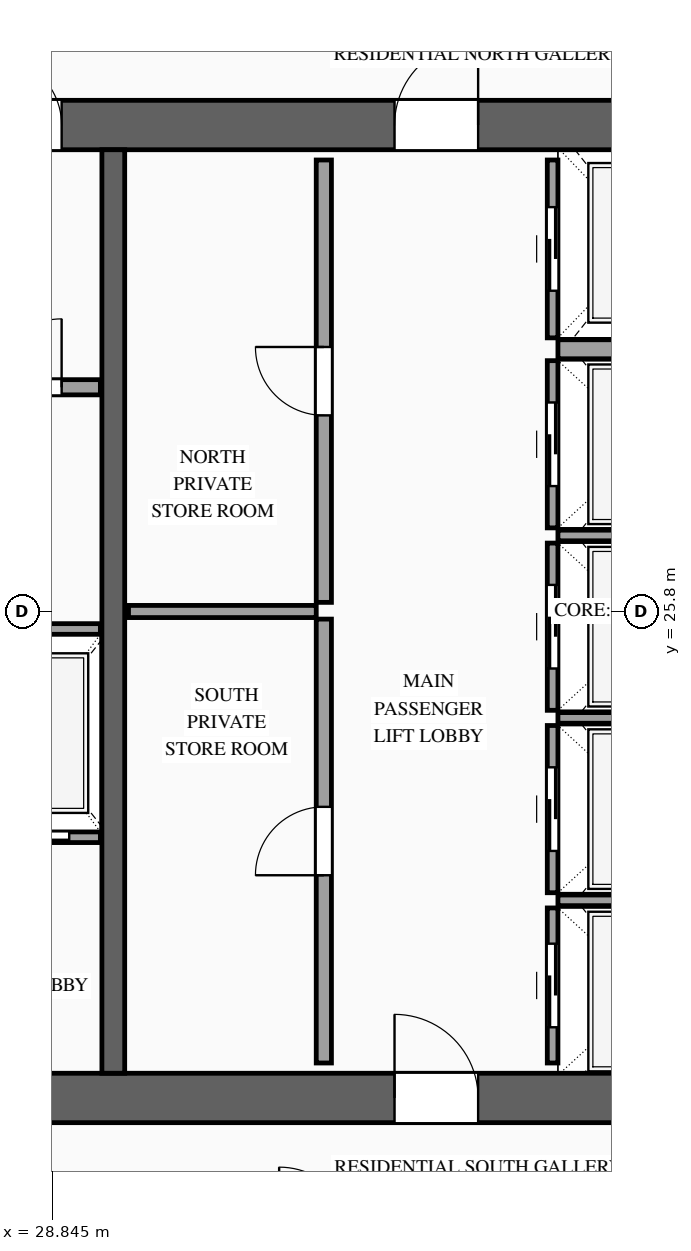
"""IFC4 building model, lengths in metres.
Left out: names, types, materials, properties, quantities, classifications, styles, units other than length and angle.
Written with IfcOpenShell. Run it as: python <this file> out.ifc"""

import sys

from ifc_helpers import new_model, si_unit, direction, frame, frame_2d, origin, place, context, subcontext, project, spatial, rectangle, extrude, source, transform, mapped, element, fill, save


model = new_model("IFC4")
c1 = context("Model", 3, precision=1e-05, world=origin(), true_north=direction((0.0, 1.0)))
c2 = subcontext(c1, "Body", "Model", "MODEL_VIEW")
j1 = project(units=[si_unit("LENGTHUNIT", "METRE"), si_unit("PLANEANGLEUNIT", "RADIAN")], contexts=[c1])
p1 = place(None, origin())
s1 = spatial("IfcSite", under=j1, at=p1, CompositionType="ELEMENT")
p2 = place(p1, origin())
s2 = spatial("IfcBuilding", under=s1, at=p2, CompositionType="ELEMENT")
p3 = place(p2, frame((0.0, 0.0, 181.0)))
s3 = spatial("IfcBuildingStorey", under=s2, at=p3, CompositionType="ELEMENT", Elevation=181.0)
p4 = place(p3, frame((23.475, 19.4, 0.0), z_axis=(0.0, 0.0, 1.0), x_axis=(1.0, 0.0, 0.0)))
e1 = element("IfcWall", 1, at=p4, inside=s3, PredefinedType="SHEAR", context=c2, shape_type="SweptSolid", body=[
    extrude(rectangle(XDim=27.05, YDim=0.65, at=frame_2d((13.525, 0.0))), origin(), (0.0, 0.0, 1.0), 3.5),
])
p5 = place(p4, frame((1.975, 0.0, 0.0)))
e2 = element("IfcOpeningElement", 2, at=p5, cuts=e1, PredefinedType="OPENING", context=c2, shape_type="SweptSolid", body=[
    extrude(rectangle(XDim=1.1, YDim=2.2, at=frame_2d((0.55, 1.1))), frame((0.0, 0.34, 0.0), z_axis=(0.0, -1.0, 0.0), x_axis=(1.0, 0.0, 0.0)), (0.0, 0.0, 1.0), 0.68),
])
p6 = place(p4, frame((9.875, 0.0, 0.0)))
e3 = element("IfcOpeningElement", 3, at=p6, cuts=e1, PredefinedType="OPENING", context=c2, shape_type="SweptSolid", body=[
    extrude(rectangle(XDim=1.1, YDim=2.2, at=frame_2d((0.55, 1.1))), frame((0.0, 0.34, 0.0), z_axis=(0.0, -1.0, 0.0), x_axis=(1.0, 0.0, 0.0)), (0.0, 0.0, 1.0), 0.68),
])
p7 = place(p4, frame((23.075, 0.0, 0.0)))
e4 = element("IfcOpeningElement", 4, at=p7, cuts=e1, PredefinedType="OPENING", context=c2, shape_type="SweptSolid", body=[
    extrude(rectangle(XDim=1.1, YDim=2.2, at=frame_2d((0.55, 1.1))), frame((0.0, 0.34, 0.0), z_axis=(0.0, -1.0, 0.0), x_axis=(1.0, 0.0, 0.0)), (0.0, 0.0, 1.0), 0.68),
])
p8 = place(p4, frame((19.695, 0.0, 0.0)))
e5 = element("IfcOpeningElement", 5, at=p8, cuts=e1, PredefinedType="OPENING", context=c2, shape_type="SweptSolid", body=[
    extrude(rectangle(XDim=0.9, YDim=2.15, at=frame_2d((0.45, 1.075))), frame((0.0, 0.34, 0.0), z_axis=(0.0, -1.0, 0.0), x_axis=(1.0, 0.0, 0.0)), (0.0, 0.0, 1.0), 0.68),
])
p9 = place(p4, frame((18.255, 0.0, 0.0)))
e6 = element("IfcOpeningElement", 6, at=p9, cuts=e1, PredefinedType="OPENING", context=c2, shape_type="SweptSolid", body=[
    extrude(rectangle(XDim=0.9, YDim=2.15, at=frame_2d((0.45, 1.075))), frame((0.0, 0.34, 0.0), z_axis=(0.0, -1.0, 0.0), x_axis=(1.0, 0.0, 0.0)), (0.0, 0.0, 1.0), 0.68),
])
p10 = place(p3, frame((23.475, 32.2, 0.0), z_axis=(0.0, 0.0, 1.0), x_axis=(1.0, 0.0, 0.0)))
e7 = element("IfcWall", 7, at=p10, inside=s3, PredefinedType="SHEAR", context=c2, shape_type="SweptSolid", body=[
    extrude(rectangle(XDim=27.05, YDim=0.65, at=frame_2d((13.525, 0.0))), origin(), (0.0, 0.0, 1.0), 3.5),
])
p11 = place(p10, frame((4.595, 0.0, 0.0)))
e8 = element("IfcOpeningElement", 8, at=p11, cuts=e7, PredefinedType="OPENING", context=c2, shape_type="SweptSolid", body=[
    extrude(rectangle(XDim=0.9, YDim=2.15, at=frame_2d((0.45, 1.075))), frame((0.0, 0.34, 0.0), z_axis=(0.0, -1.0, 0.0), x_axis=(1.0, 0.0, 0.0)), (0.0, 0.0, 1.0), 0.68),
])
p12 = place(p10, frame((9.875, 0.0, 0.0)))
e9 = element("IfcOpeningElement", 9, at=p12, cuts=e7, PredefinedType="OPENING", context=c2, shape_type="SweptSolid", body=[
    extrude(rectangle(XDim=1.1, YDim=2.2, at=frame_2d((0.55, 1.1))), frame((0.0, 0.34, 0.0), z_axis=(0.0, -1.0, 0.0), x_axis=(1.0, 0.0, 0.0)), (0.0, 0.0, 1.0), 0.68),
])
p13 = place(p10, frame((15.725, 0.0, 0.0)))
e10 = element("IfcOpeningElement", 10, at=p13, cuts=e7, PredefinedType="OPENING", context=c2, shape_type="SweptSolid", body=[
    extrude(rectangle(XDim=1.1, YDim=2.2, at=frame_2d((0.55, 1.1))), frame((0.0, 0.34, 0.0), z_axis=(0.0, -1.0, 0.0), x_axis=(1.0, 0.0, 0.0)), (0.0, 0.0, 1.0), 0.68),
])
p14 = place(p10, frame((19.695, 0.0, 0.0)))
e11 = element("IfcOpeningElement", 11, at=p14, cuts=e7, PredefinedType="OPENING", context=c2, shape_type="SweptSolid", body=[
    extrude(rectangle(XDim=0.9, YDim=2.15, at=frame_2d((0.45, 1.075))), frame((0.0, 0.34, 0.0), z_axis=(0.0, -1.0, 0.0), x_axis=(1.0, 0.0, 0.0)), (0.0, 0.0, 1.0), 0.68),
])
m1 = source(origin(), c2, "Body", "SweptSolid", [
    extrude(rectangle(XDim=12.15, YDim=0.3, at=frame_2d((6.075, 0.0))), origin(), (0.0, 0.0, 1.0), 3.5),
])
p15 = place(p3, frame((29.65, 19.725, 0.0), z_axis=(0.0, 0.0, 1.0), x_axis=(0.0, 1.0, 0.0)))
e12 = element("IfcWall", 12, at=p15, inside=s3, PredefinedType="SOLIDWALL", context=c2, shape_type="MappedRepresentation", body=[
    mapped(m1, transform((0.0, 0.0, 0.0), scale=1.0)),
])
p16 = place(p3, frame((27.56, 22.83, 0.0), z_axis=(0.0, 0.0, 1.0), x_axis=(1.0, 0.0, 0.0)))
e13 = element("IfcWall", 13, at=p16, inside=s3, PredefinedType="SOLIDWALL", context=c2, shape_type="SweptSolid", body=[
    extrude(rectangle(XDim=1.92, YDim=0.14, at=frame_2d((0.96, 0.0))), origin(), (0.0, 0.0, 1.0), 3.28),
])
p17 = place(p16, frame((0.41, 0.0, 0.0)))
e14 = element("IfcOpeningElement", 14, at=p17, cuts=e13, PredefinedType="OPENING", context=c2, shape_type="SweptSolid", body=[
    extrude(rectangle(XDim=1.1, YDim=2.2, at=frame_2d((0.55, 1.1))), frame((0.0, 0.085, 0.0), z_axis=(0.0, -1.0, 0.0), x_axis=(1.0, 0.0, 0.0)), (0.0, 0.0, 1.0), 0.17),
])
m2 = source(origin(), c2, "Body", "SweptSolid", [
    extrude(rectangle(XDim=1.92, YDim=0.14, at=frame_2d((0.96, 0.0))), origin(), (0.0, 0.0, 1.0), 3.28),
])
p18 = place(p3, frame((27.56, 25.57, 0.0), z_axis=(0.0, 0.0, 1.0), x_axis=(1.0, 0.0, 0.0)))
e15 = element("IfcWall", 15, at=p18, inside=s3, PredefinedType="SOLIDWALL", context=c2, shape_type="MappedRepresentation", body=[
    mapped(m2, transform((0.0, 0.0, 0.0), scale=1.0)),
])
p19 = place(p3, frame((35.43, 19.86, 0.0), z_axis=(0.0, 0.0, 1.0), x_axis=(0.0, 1.0, 0.0)))
e16 = element("IfcWall", 16, at=p19, inside=s3, PredefinedType="SOLIDWALL", context=c2, shape_type="SweptSolid", body=[
    extrude(rectangle(XDim=2.04, YDim=0.14, at=frame_2d((1.02, 0.0))), origin(), (0.0, 0.0, 1.0), 3.28),
])
p20 = place(p19, frame((0.47, 0.0, 0.0)))
e17 = element("IfcOpeningElement", 17, at=p20, cuts=e16, PredefinedType="OPENING", context=c2, shape_type="SweptSolid", body=[
    extrude(rectangle(XDim=1.1, YDim=2.2, at=frame_2d((0.55, 1.1))), frame((0.0, 0.085, 0.0), z_axis=(0.0, -1.0, 0.0), x_axis=(1.0, 0.0, 0.0)), (0.0, 0.0, 1.0), 0.17),
])
m3 = source(origin(), c2, "Body", "SweptSolid", [
    extrude(rectangle(XDim=2.4, YDim=0.14, at=frame_2d((1.2, 0.0))), origin(), (0.0, 0.0, 1.0), 3.28),
])
p21 = place(p3, frame((35.5, 22.0, 0.0), z_axis=(0.0, 0.0, 1.0), x_axis=(1.0, 0.0, 0.0)))
e18 = element("IfcWall", 18, at=p21, inside=s3, PredefinedType="SOLIDWALL", context=c2, shape_type="MappedRepresentation", body=[
    mapped(m3, transform((0.0, 0.0, 0.0), scale=1.0)),
])
p22 = place(p3, frame((35.43, 22.1, 0.0), z_axis=(0.0, 0.0, 1.0), x_axis=(0.0, 1.0, 0.0)))
e19 = element("IfcWall", 19, at=p22, inside=s3, PredefinedType="SOLIDWALL", context=c2, shape_type="SweptSolid", body=[
    extrude(rectangle(XDim=2.2, YDim=0.14, at=frame_2d((1.1, 0.0))), origin(), (0.0, 0.0, 1.0), 3.28),
])
p23 = place(p22, frame((0.55, 0.0, 0.0)))
e20 = element("IfcOpeningElement", 20, at=p23, cuts=e19, PredefinedType="OPENING", context=c2, shape_type="SweptSolid", body=[
    extrude(rectangle(XDim=1.1, YDim=2.2, at=frame_2d((0.55, 1.1))), frame((0.0, 0.085, 0.0), z_axis=(0.0, -1.0, 0.0), x_axis=(1.0, 0.0, 0.0)), (0.0, 0.0, 1.0), 0.17),
])
p24 = place(p3, frame((35.5, 24.4, 0.0), z_axis=(0.0, 0.0, 1.0), x_axis=(1.0, 0.0, 0.0)))
e21 = element("IfcWall", 21, at=p24, inside=s3, PredefinedType="SOLIDWALL", context=c2, shape_type="MappedRepresentation", body=[
    mapped(m3, transform((0.0, 0.0, 0.0), scale=1.0)),
])
p25 = place(p3, frame((35.43, 24.5, 0.0), z_axis=(0.0, 0.0, 1.0), x_axis=(0.0, 1.0, 0.0)))
e22 = element("IfcWall", 22, at=p25, inside=s3, PredefinedType="SOLIDWALL", context=c2, shape_type="SweptSolid", body=[
    extrude(rectangle(XDim=2.2, YDim=0.14, at=frame_2d((1.1, 0.0))), origin(), (0.0, 0.0, 1.0), 3.28),
])
p26 = place(p25, frame((0.55, 0.0, 0.0)))
e23 = element("IfcOpeningElement", 23, at=p26, cuts=e22, PredefinedType="OPENING", context=c2, shape_type="SweptSolid", body=[
    extrude(rectangle(XDim=1.1, YDim=2.2, at=frame_2d((0.55, 1.1))), frame((0.0, 0.085, 0.0), z_axis=(0.0, -1.0, 0.0), x_axis=(1.0, 0.0, 0.0)), (0.0, 0.0, 1.0), 0.17),
])
p27 = place(p3, frame((35.5, 26.8, 0.0), z_axis=(0.0, 0.0, 1.0), x_axis=(1.0, 0.0, 0.0)))
e24 = element("IfcWall", 24, at=p27, inside=s3, PredefinedType="SOLIDWALL", context=c2, shape_type="MappedRepresentation", body=[
    mapped(m3, transform((0.0, 0.0, 0.0), scale=1.0)),
])
p28 = place(p3, frame((35.43, 26.9, 0.0), z_axis=(0.0, 0.0, 1.0), x_axis=(0.0, 1.0, 0.0)))
e25 = element("IfcWall", 25, at=p28, inside=s3, PredefinedType="SOLIDWALL", context=c2, shape_type="SweptSolid", body=[
    extrude(rectangle(XDim=2.2, YDim=0.14, at=frame_2d((1.1, 0.0))), origin(), (0.0, 0.0, 1.0), 3.28),
])
p29 = place(p28, frame((0.55, 0.0, 0.0)))
e26 = element("IfcOpeningElement", 26, at=p29, cuts=e25, PredefinedType="OPENING", context=c2, shape_type="SweptSolid", body=[
    extrude(rectangle(XDim=1.1, YDim=2.2, at=frame_2d((0.55, 1.1))), frame((0.0, 0.085, 0.0), z_axis=(0.0, -1.0, 0.0), x_axis=(1.0, 0.0, 0.0)), (0.0, 0.0, 1.0), 0.17),
])
p30 = place(p3, frame((35.43, 29.4, 0.0), z_axis=(0.0, 0.0, 1.0), x_axis=(0.0, 1.0, 0.0)))
e27 = element("IfcWall", 27, at=p30, inside=s3, PredefinedType="SOLIDWALL", context=c2, shape_type="SweptSolid", body=[
    extrude(rectangle(XDim=2.34, YDim=0.14, at=frame_2d((1.17, 0.0))), origin(), (0.0, 0.0, 1.0), 3.28),
])
p31 = place(p30, frame((0.62, 0.0, 0.0)))
e28 = element("IfcOpeningElement", 28, at=p31, cuts=e27, PredefinedType="OPENING", context=c2, shape_type="SweptSolid", body=[
    extrude(rectangle(XDim=1.1, YDim=2.2, at=frame_2d((0.55, 1.1))), frame((0.0, 0.085, 0.0), z_axis=(0.0, -1.0, 0.0), x_axis=(1.0, 0.0, 0.0)), (0.0, 0.0, 1.0), 0.17),
])
m4 = source(origin(), c2, "Body", "SweptSolid", [
    extrude(rectangle(XDim=2.4, YDim=0.25, at=frame_2d((1.2, 0.0))), origin(), (0.0, 0.0, 1.0), 3.28),
])
p32 = place(p3, frame((35.5, 29.25, 0.0), z_axis=(0.0, 0.0, 1.0), x_axis=(1.0, 0.0, 0.0)))
e29 = element("IfcWall", 29, at=p32, inside=s3, PredefinedType="SOLIDWALL", context=c2, shape_type="MappedRepresentation", body=[
    mapped(m4, transform((0.0, 0.0, 0.0), scale=1.0)),
])
p33 = place(p3, frame((27.56, 28.75, 0.0), z_axis=(0.0, 0.0, 1.0), x_axis=(1.0, 0.0, 0.0)))
e30 = element("IfcWall", 30, at=p33, inside=s3, PredefinedType="PARTITIONING", context=c2, shape_type="SweptSolid", body=[
    extrude(rectangle(XDim=1.92, YDim=0.2, at=frame_2d((0.96, 0.0))), origin(), (0.0, 0.0, 1.0), 3.28),
])
p34 = place(p33, frame((0.51, 0.0, 0.0)))
e31 = element("IfcOpeningElement", 31, at=p34, cuts=e30, PredefinedType="OPENING", context=c2, shape_type="SweptSolid", body=[
    extrude(rectangle(XDim=0.9, YDim=2.15, at=frame_2d((0.45, 1.075))), frame((0.0, 0.115, 0.0), z_axis=(0.0, -1.0, 0.0), x_axis=(1.0, 0.0, 0.0)), (0.0, 0.0, 1.0), 0.23),
])
p35 = place(p3, frame((32.42, 19.86, 0.0), z_axis=(0.0, 0.0, 1.0), x_axis=(0.0, 1.0, 0.0)))
e32 = element("IfcWall", 32, at=p35, inside=s3, PredefinedType="PARTITIONING", context=c2, shape_type="SweptSolid", body=[
    extrude(rectangle(XDim=5.84, YDim=0.2, at=frame_2d((2.92, 0.0))), origin(), (0.0, 0.0, 1.0), 3.28),
])
p36 = place(p35, frame((2.47, 0.0, 0.0)))
e33 = element("IfcOpeningElement", 33, at=p36, cuts=e32, PredefinedType="OPENING", context=c2, shape_type="SweptSolid", body=[
    extrude(rectangle(XDim=0.9, YDim=2.15, at=frame_2d((0.45, 1.075))), frame((0.0, 0.115, 0.0), z_axis=(0.0, -1.0, 0.0), x_axis=(1.0, 0.0, 0.0)), (0.0, 0.0, 1.0), 0.23),
])
p37 = place(p3, frame((32.42, 25.92, 0.0), z_axis=(0.0, 0.0, 1.0), x_axis=(0.0, 1.0, 0.0)))
e34 = element("IfcWall", 34, at=p37, inside=s3, PredefinedType="PARTITIONING", context=c2, shape_type="SweptSolid", body=[
    extrude(rectangle(XDim=5.82, YDim=0.2, at=frame_2d((2.91, 0.0))), origin(), (0.0, 0.0, 1.0), 3.28),
])
p38 = place(p37, frame((2.46, 0.0, 0.0)))
e35 = element("IfcOpeningElement", 35, at=p38, cuts=e34, PredefinedType="OPENING", context=c2, shape_type="SweptSolid", body=[
    extrude(rectangle(XDim=0.9, YDim=2.15, at=frame_2d((0.45, 1.075))), frame((0.0, 0.115, 0.0), z_axis=(0.0, -1.0, 0.0), x_axis=(1.0, 0.0, 0.0)), (0.0, 0.0, 1.0), 0.23),
])
m5 = source(origin(), c2, "Body", "SweptSolid", [
    extrude(rectangle(XDim=2.47, YDim=0.16, at=frame_2d((1.235, 0.0))), origin(), (0.0, 0.0, 1.0), 3.28),
])
p39 = place(p3, frame((29.85, 25.8, 0.0), z_axis=(0.0, 0.0, 1.0), x_axis=(1.0, 0.0, 0.0)))
e36 = element("IfcWall", 36, at=p39, inside=s3, PredefinedType="PARTITIONING", context=c2, shape_type="MappedRepresentation", body=[
    mapped(m5, transform((0.0, 0.0, 0.0), scale=1.0)),
])
m6 = source(origin(), c2, "Body", "SweptSolid", [
    extrude(rectangle(XDim=1.1, YDim=2.2, at=frame_2d((0.55, 1.1))), frame((0.0, 0.025, 0.0), z_axis=(0.0, -1.0, 0.0), x_axis=(1.0, 0.0, 0.0)), (0.0, 0.0, 1.0), 0.05),
])
p40 = place(p17, origin())
e37 = element("IfcDoor", 37, at=p40, inside=s3, OperationType="SLIDING_TO_LEFT", PredefinedType="DOOR", context=c2, shape_type="MappedRepresentation", body=[
    mapped(m6, transform((0.0, 0.0, 0.0), scale=1.0)),
])
fill(e14, e37)
p41 = place(p20, origin())
e38 = element("IfcDoor", 38, at=p41, inside=s3, OperationType="SLIDING_TO_RIGHT", PredefinedType="DOOR", context=c2, shape_type="MappedRepresentation", body=[
    mapped(m6, transform((0.0, 0.0, 0.0), scale=1.0)),
])
fill(e17, e38)
p42 = place(p23, origin())
e39 = element("IfcDoor", 39, at=p42, inside=s3, OperationType="SLIDING_TO_LEFT", PredefinedType="DOOR", context=c2, shape_type="MappedRepresentation", body=[
    mapped(m6, transform((0.0, 0.0, 0.0), scale=1.0)),
])
fill(e20, e39)
p43 = place(p26, origin())
e40 = element("IfcDoor", 40, at=p43, inside=s3, OperationType="SLIDING_TO_RIGHT", PredefinedType="DOOR", context=c2, shape_type="MappedRepresentation", body=[
    mapped(m6, transform((0.0, 0.0, 0.0), scale=1.0)),
])
fill(e23, e40)
p44 = place(p29, origin())
e41 = element("IfcDoor", 41, at=p44, inside=s3, OperationType="SLIDING_TO_LEFT", PredefinedType="DOOR", context=c2, shape_type="MappedRepresentation", body=[
    mapped(m6, transform((0.0, 0.0, 0.0), scale=1.0)),
])
fill(e26, e41)
p45 = place(p31, origin())
e42 = element("IfcDoor", 42, at=p45, inside=s3, OperationType="SLIDING_TO_RIGHT", PredefinedType="DOOR", context=c2, shape_type="MappedRepresentation", body=[
    mapped(m6, transform((0.0, 0.0, 0.0), scale=1.0)),
])
fill(e28, e42)
m7 = source(origin(), c2, "Body", "SweptSolid", [
    extrude(rectangle(XDim=1.1, YDim=2.2, at=frame_2d((0.55, 1.1))), frame((0.0, 0.025, 0.0), z_axis=(0.0, -1.0, 0.0), x_axis=(1.0, 0.0, 0.0)), (0.0, 0.0, 1.0), 0.05),
])
p46 = place(p6, origin())
e43 = element("IfcDoor", 43, at=p46, inside=s3, OperationType="SINGLE_SWING_LEFT", PredefinedType="DOOR", context=c2, shape_type="MappedRepresentation", body=[
    mapped(m7, transform((0.0, 0.0, 0.0), scale=1.0)),
])
fill(e3, e43)
m8 = source(origin(), c2, "Body", "SweptSolid", [
    extrude(rectangle(XDim=0.9, YDim=2.15, at=frame_2d((0.45, 1.075))), frame((0.0, 0.025, 0.0), z_axis=(0.0, -1.0, 0.0), x_axis=(1.0, 0.0, 0.0)), (0.0, 0.0, 1.0), 0.05),
])
p47 = place(p11, origin())
e44 = element("IfcDoor", 44, at=p47, inside=s3, OperationType="SINGLE_SWING_LEFT", PredefinedType="DOOR", context=c2, shape_type="MappedRepresentation", body=[
    mapped(m8, transform((0.0, 0.0, 0.0), scale=1.0)),
])
fill(e8, e44)
p48 = place(p12, origin())
e45 = element("IfcDoor", 45, at=p48, inside=s3, OperationType="SINGLE_SWING_RIGHT", PredefinedType="DOOR", context=c2, shape_type="MappedRepresentation", body=[
    mapped(m7, transform((0.0, 0.0, 0.0), scale=1.0)),
])
fill(e9, e45)
p49 = place(p34, origin())
e46 = element("IfcDoor", 46, at=p49, inside=s3, OperationType="SINGLE_SWING_RIGHT", PredefinedType="DOOR", context=c2, shape_type="MappedRepresentation", body=[
    mapped(m8, transform((0.0, 0.0, 0.0), scale=1.0)),
])
fill(e31, e46)
p50 = place(p36, origin())
e47 = element("IfcDoor", 47, at=p50, inside=s3, OperationType="SINGLE_SWING_LEFT", PredefinedType="DOOR", context=c2, shape_type="MappedRepresentation", body=[
    mapped(m8, transform((0.0, 0.0, 0.0), scale=1.0)),
])
fill(e33, e47)
p51 = place(p38, origin())
e48 = element("IfcDoor", 48, at=p51, inside=s3, OperationType="SINGLE_SWING_RIGHT", PredefinedType="DOOR", context=c2, shape_type="MappedRepresentation", body=[
    mapped(m8, transform((0.0, 0.0, 0.0), scale=1.0)),
])
fill(e35, e48)
save(model, sys.argv[1])
